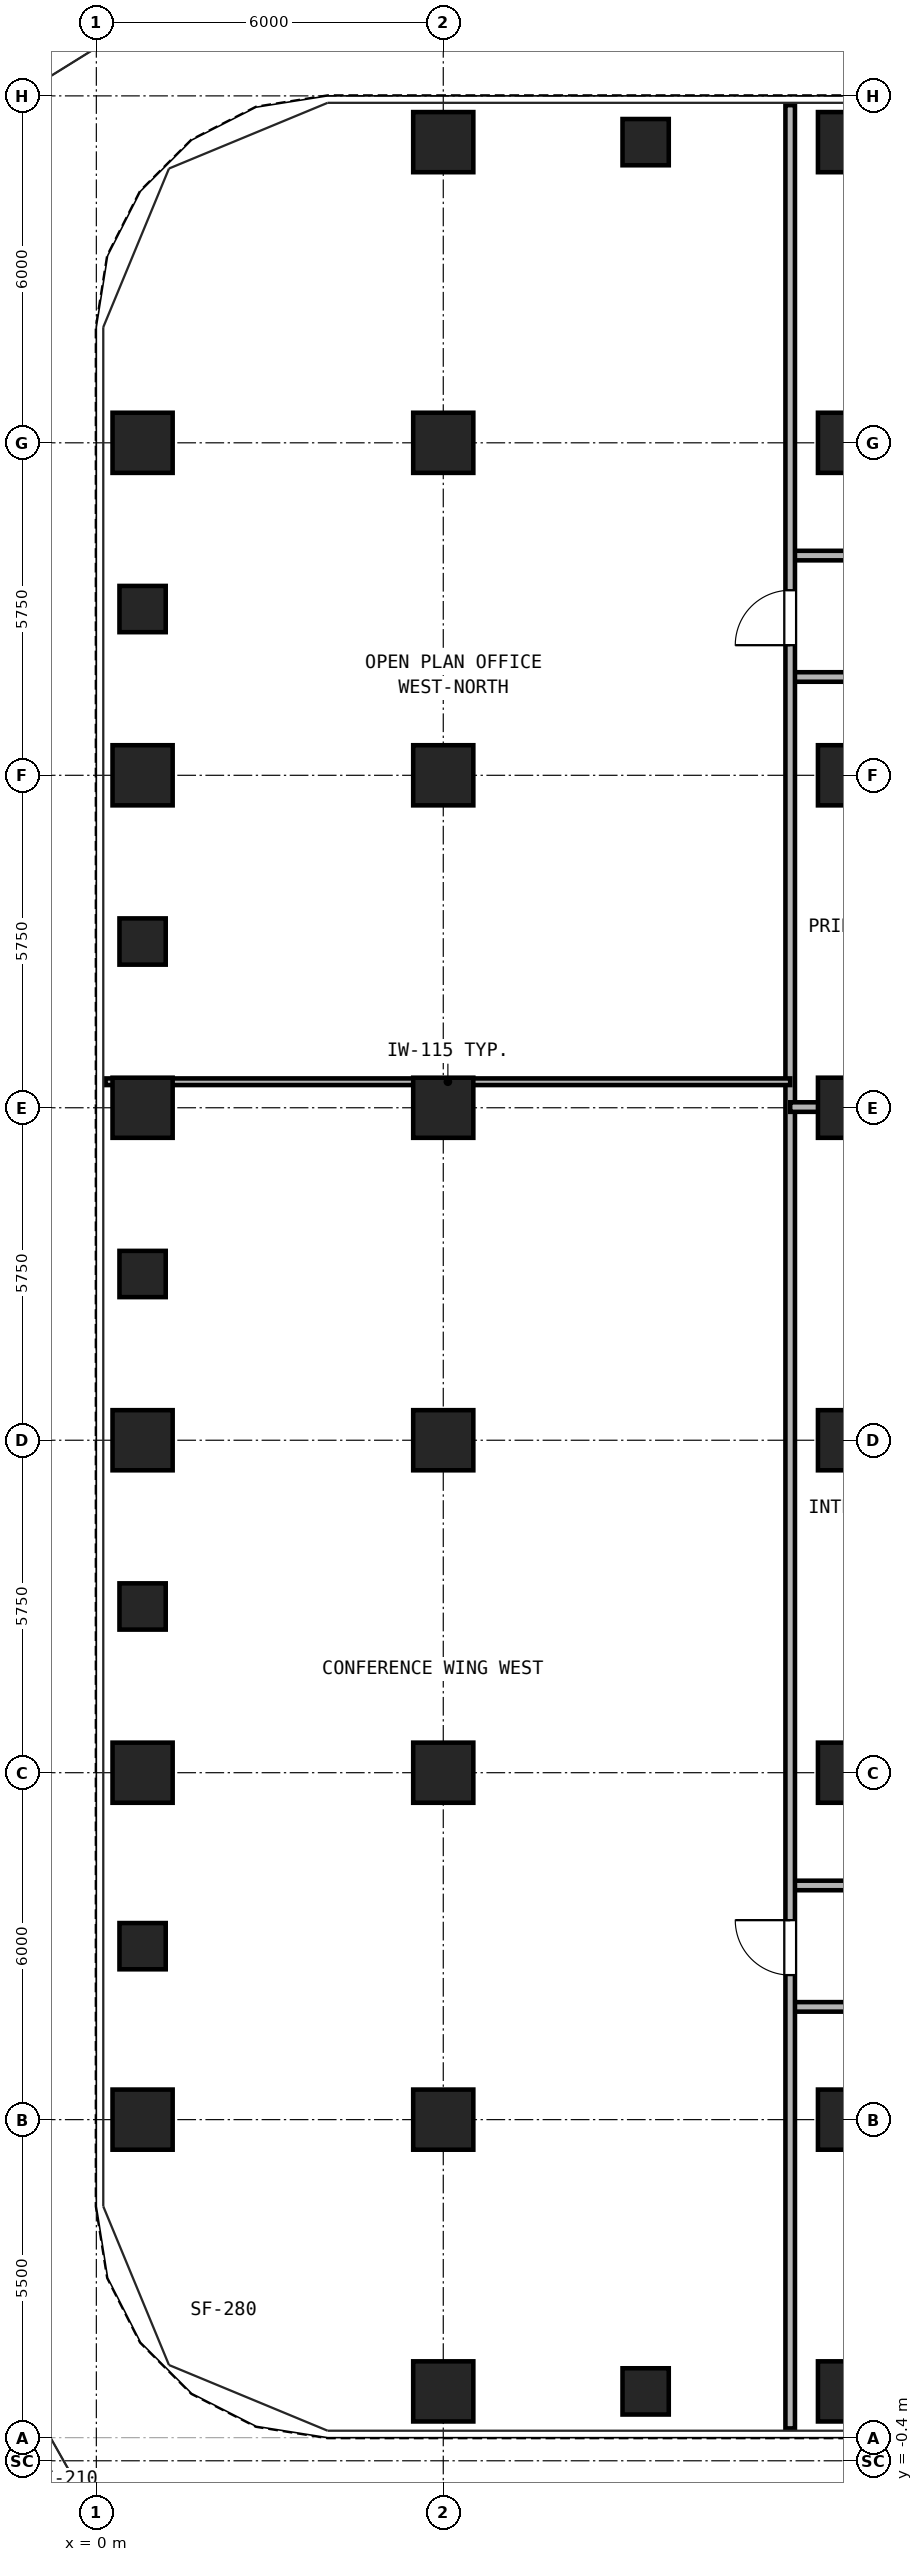
"""IFC4 building model, lengths in metres.
Left out: names, types, materials, properties, quantities, classifications, styles, units other than length and angle.
Written with IfcOpenShell. Run it as: python <this file> out.ifc"""

import sys

from ifc_helpers import new_model, si_unit, direction, frame, frame_2d, origin, origin_2d, place, context, subcontext, project, spatial, rectangle, hollow_rectangle, extrude, source, transform, mapped, element, fill, save


model = new_model("IFC4")
c1 = context("Model", 3, precision=1e-05, world=origin(), true_north=direction((0.0, 1.0)))
c2 = subcontext(c1, "Body", "Model", "MODEL_VIEW")
j1 = project(units=[si_unit("LENGTHUNIT", "METRE"), si_unit("PLANEANGLEUNIT", "RADIAN")], contexts=[c1])
p1 = place(None, origin())
s1 = spatial("IfcSite", under=j1, at=p1, CompositionType="ELEMENT")
p2 = place(p1, origin())
s2 = spatial("IfcBuilding", under=s1, at=p2, CompositionType="ELEMENT")
p3 = place(p2, frame((0.0, 0.0, 62.1)))
s3 = spatial("IfcBuildingStorey", under=s2, at=p3, CompositionType="ELEMENT", Elevation=62.1)
m1 = source(origin(), c2, "Body", "SweptSolid", [
    extrude(hollow_rectangle(XDim=1.04, YDim=1.04, WallThickness=0.065, at=origin_2d()), origin(), (0.0, 0.0, 1.0), 3.32),
])
for number, where, z_axis, x_axis in (
    (1, (6.0, 0.8, 0.0), (0.0, 0.0, 1.0), (1.0, 0.0, 0.0)),
    (2, (6.0, 39.7, 0.0), (0.0, 0.0, 1.0), (1.0, 0.0, 0.0)),
    (3, (13.0, 0.8, 0.0), (0.0, 0.0, 1.0), (1.0, 0.0, 0.0)),
    (4, (13.0, 39.7, 0.0), (0.0, 0.0, 1.0), (1.0, 0.0, 0.0)),
    (5, (0.8, 5.5, 0.0), (0.0, 0.0, 1.0), (1.0, 0.0, 0.0)),
    (6, (0.8, 11.5, 0.0), (0.0, 0.0, 1.0), (1.0, 0.0, 0.0)),
    (7, (0.8, 17.25, 0.0), (0.0, 0.0, 1.0), (1.0, 0.0, 0.0)),
    (8, (0.8, 23.0, 0.0), (0.0, 0.0, 1.0), (1.0, 0.0, 0.0)),
    (9, (0.8, 28.75, 0.0), (0.0, 0.0, 1.0), (1.0, 0.0, 0.0)),
    (10, (0.8, 34.5, 0.0), (0.0, 0.0, 1.0), (1.0, 0.0, 0.0)),
    (11, (6.0, 5.5, 0.0), (0.0, 0.0, 1.0), (1.0, 0.0, 0.0)),
    (12, (6.0, 11.5, 0.0), (0.0, 0.0, 1.0), (1.0, 0.0, 0.0)),
    (13, (6.0, 17.25, 0.0), (0.0, 0.0, 1.0), (1.0, 0.0, 0.0)),
    (14, (6.0, 23.0, 0.0), (0.0, 0.0, 1.0), (1.0, 0.0, 0.0)),
    (15, (6.0, 28.75, 0.0), (0.0, 0.0, 1.0), (1.0, 0.0, 0.0)),
    (16, (6.0, 34.5, 0.0), (0.0, 0.0, 1.0), (1.0, 0.0, 0.0)),
    (17, (13.0, 5.5, 0.0), (0.0, 0.0, 1.0), (1.0, 0.0, 0.0)),
    (18, (13.0, 11.5, 0.0), (0.0, 0.0, 1.0), (1.0, 0.0, 0.0)),
    (19, (13.0, 17.25, 0.0), (0.0, 0.0, 1.0), (1.0, 0.0, 0.0)),
    (20, (13.0, 23.0, 0.0), (0.0, 0.0, 1.0), (1.0, 0.0, 0.0)),
    (21, (13.0, 28.75, 0.0), (0.0, 0.0, 1.0), (1.0, 0.0, 0.0)),
    (22, (13.0, 34.5, 0.0), (0.0, 0.0, 1.0), (1.0, 0.0, 0.0)),
):
    element("IfcColumn", number, at=place(p3, frame(where, z_axis=z_axis, x_axis=x_axis)), inside=s3, PredefinedType="COLUMN", context=c2, shape_type="MappedRepresentation", body=[
        mapped(m1, transform((0.0, 0.0, 0.0), x_axis=(1.0, 0.0, 0.0), y_axis=(0.0, 1.0, 0.0), z_axis=(0.0, 0.0, 1.0), scale=1.0)),
    ])
m2 = source(origin(), c2, "Body", "SweptSolid", [
    extrude(hollow_rectangle(XDim=0.8, YDim=0.8, WallThickness=0.045, at=origin_2d()), origin(), (0.0, 0.0, 1.0), 3.32),
])
for number, where, z_axis, x_axis in (
    (23, (9.5, 0.8, 0.0), (0.0, 0.0, 1.0), (1.0, 0.0, 0.0)),
    (24, (9.5, 39.7, 0.0), (0.0, 0.0, 1.0), (1.0, 0.0, 0.0)),
    (25, (0.8, 8.5, 0.0), (0.0, 0.0, 1.0), (1.0, 0.0, 0.0)),
    (26, (0.8, 14.375, 0.0), (0.0, 0.0, 1.0), (1.0, 0.0, 0.0)),
    (27, (0.8, 20.125, 0.0), (0.0, 0.0, 1.0), (1.0, 0.0, 0.0)),
    (28, (0.8, 25.875, 0.0), (0.0, 0.0, 1.0), (1.0, 0.0, 0.0)),
    (29, (0.8, 31.625, 0.0), (0.0, 0.0, 1.0), (1.0, 0.0, 0.0)),
):
    element("IfcColumn", number, at=place(p3, frame(where, z_axis=z_axis, x_axis=x_axis)), inside=s3, PredefinedType="COLUMN", context=c2, shape_type="MappedRepresentation", body=[
        mapped(m2, transform((0.0, 0.0, 0.0), x_axis=(1.0, 0.0, 0.0), y_axis=(0.0, 1.0, 0.0), z_axis=(0.0, 0.0, 1.0), scale=1.0)),
    ])
p4 = place(p3, frame((12.0, 7.45, 0.0), z_axis=(0.0, 0.0, 1.0), x_axis=(1.0, 0.0, 0.0)))
e30 = element("IfcWall", 30, at=p4, inside=s3, PredefinedType="PARTITIONING", context=c2, shape_type="SweptSolid", body=[
    extrude(rectangle(XDim=23.0, YDim=0.165, at=frame_2d((11.5, 0.0))), origin(), (0.0, 0.0, 1.0), 3.32),
])
p5 = place(p4, frame((7.5, 0.0, 0.0)))
e31 = element("IfcOpeningElement", 31, at=p5, cuts=e30, PredefinedType="OPENING", context=c2, shape_type="SweptSolid", body=[
    extrude(rectangle(XDim=0.95, YDim=2.15, at=frame_2d((0.475, 1.075))), frame((0.0, 0.093, 0.0), z_axis=(0.0, -1.0, 0.0), x_axis=(1.0, 0.0, 0.0)), (0.0, 0.0, 1.0), 0.185),
])
p6 = place(p4, frame((17.9, 0.0, 0.0)))
e32 = element("IfcOpeningElement", 32, at=p6, cuts=e30, PredefinedType="OPENING", context=c2, shape_type="SweptSolid", body=[
    extrude(rectangle(XDim=0.95, YDim=2.15, at=frame_2d((0.475, 1.075))), frame((0.0, 0.093, 0.0), z_axis=(0.0, -1.0, 0.0), x_axis=(1.0, 0.0, 0.0)), (0.0, 0.0, 1.0), 0.185),
])
p7 = place(p4, frame((21.4, 0.0, 0.0)))
e33 = element("IfcOpeningElement", 33, at=p7, cuts=e30, PredefinedType="OPENING", context=c2, shape_type="SweptSolid", body=[
    extrude(rectangle(XDim=0.92, YDim=2.1, at=frame_2d((0.46, 1.05))), frame((0.0, 0.093, 0.0), z_axis=(0.0, -1.0, 0.0), x_axis=(1.0, 0.0, 0.0)), (0.0, 0.0, 1.0), 0.185),
])
p8 = place(p3, frame((12.0, 32.55, 0.0), z_axis=(0.0, 0.0, 1.0), x_axis=(1.0, 0.0, 0.0)))
e34 = element("IfcWall", 34, at=p8, inside=s3, PredefinedType="PARTITIONING", context=c2, shape_type="SweptSolid", body=[
    extrude(rectangle(XDim=23.0, YDim=0.165, at=frame_2d((11.5, 0.0))), origin(), (0.0, 0.0, 1.0), 3.32),
])
p9 = place(p8, frame((5.75, 0.0, 0.0)))
e35 = element("IfcOpeningElement", 35, at=p9, cuts=e34, PredefinedType="OPENING", context=c2, shape_type="SweptSolid", body=[
    extrude(rectangle(XDim=0.95, YDim=2.15, at=frame_2d((0.475, 1.075))), frame((0.0, 0.093, 0.0), z_axis=(0.0, -1.0, 0.0), x_axis=(1.0, 0.0, 0.0)), (0.0, 0.0, 1.0), 0.185),
])
p10 = place(p8, frame((17.25, 0.0, 0.0)))
e36 = element("IfcOpeningElement", 36, at=p10, cuts=e34, PredefinedType="OPENING", context=c2, shape_type="SweptSolid", body=[
    extrude(rectangle(XDim=0.95, YDim=2.15, at=frame_2d((0.475, 1.075))), frame((0.0, 0.093, 0.0), z_axis=(0.0, -1.0, 0.0), x_axis=(1.0, 0.0, 0.0)), (0.0, 0.0, 1.0), 0.185),
])
for number, where, z_axis, x_axis in (
    (37, (12.0, 9.55, 0.0), (0.0, 0.0, 1.0), (1.0, 0.0, 0.0)),
    (38, (12.0, 30.45, 0.0), (0.0, 0.0, 1.0), (1.0, 0.0, 0.0)),
):
    element("IfcWall", number, at=place(p3, frame(where, z_axis=z_axis, x_axis=x_axis)), inside=s3, PredefinedType="PARTITIONING", context=c2, shape_type="SweptSolid", body=[
        extrude(rectangle(XDim=4.3, YDim=0.165, at=frame_2d((2.15, 0.0))), origin(), (0.0, 0.0, 1.0), 3.32),
    ])
p11 = place(p3, frame((12.0, 0.16, 0.0), z_axis=(0.0, 0.0, 1.0), x_axis=(0.0, 1.0, 0.0)))
e39 = element("IfcWall", 39, at=p11, inside=s3, PredefinedType="PARTITIONING", context=c2, shape_type="SweptSolid", body=[
    extrude(rectangle(XDim=40.18, YDim=0.165, at=frame_2d((20.09, 0.0))), origin(), (0.0, 0.0, 1.0), 3.32),
])
p12 = place(p11, frame((7.84, 0.0, 0.0)))
e40 = element("IfcOpeningElement", 40, at=p12, cuts=e39, PredefinedType="OPENING", context=c2, shape_type="SweptSolid", body=[
    extrude(rectangle(XDim=0.95, YDim=2.15, at=frame_2d((0.475, 1.075))), frame((0.0, 0.093, 0.0), z_axis=(0.0, -1.0, 0.0), x_axis=(1.0, 0.0, 0.0)), (0.0, 0.0, 1.0), 0.185),
])
p13 = place(p11, frame((30.84, 0.0, 0.0)))
e41 = element("IfcOpeningElement", 41, at=p13, cuts=e39, PredefinedType="OPENING", context=c2, shape_type="SweptSolid", body=[
    extrude(rectangle(XDim=0.95, YDim=2.15, at=frame_2d((0.475, 1.075))), frame((0.0, 0.093, 0.0), z_axis=(0.0, -1.0, 0.0), x_axis=(1.0, 0.0, 0.0)), (0.0, 0.0, 1.0), 0.185),
])
p14 = place(p3, frame((0.16, 23.45, 0.0), z_axis=(0.0, 0.0, 1.0), x_axis=(1.0, 0.0, 0.0)))
e42 = element("IfcWall", 42, at=p14, inside=s3, PredefinedType="PARTITIONING", context=c2, shape_type="SweptSolid", body=[
    extrude(rectangle(XDim=11.84, YDim=0.115, at=frame_2d((5.92, 0.0))), origin(), (0.0, 0.0, 1.0), 3.32),
])
p15 = place(p3, frame((12.0, 23.012, 0.0), z_axis=(0.0, 0.0, 1.0), x_axis=(1.0, 0.0, 0.0)))
e43 = element("IfcWall", 43, at=p15, inside=s3, PredefinedType="PARTITIONING", context=c2, shape_type="SweptSolid", body=[
    extrude(rectangle(XDim=4.3, YDim=0.165, at=frame_2d((2.15, 0.0))), origin(), (0.0, 0.0, 1.0), 2.539),
])
p16 = place(p12, frame((0.95, 0.0, 0.0), z_axis=(0.0, 0.0, 1.0), x_axis=(-1.0, 0.0, 0.0)))
e44 = element("IfcDoor", 44, at=p16, inside=s3, OperationType="SINGLE_SWING_RIGHT", PredefinedType="DOOR", context=c2, shape_type="SweptSolid", body=[
    extrude(rectangle(XDim=0.95, YDim=2.15, at=frame_2d((0.475, 1.075))), frame((0.0, 0.025, 0.0), z_axis=(0.0, -1.0, 0.0), x_axis=(1.0, 0.0, 0.0)), (0.0, 0.0, 1.0), 0.05),
])
fill(e40, e44)
p17 = place(p13, frame((0.95, 0.0, 0.0), z_axis=(0.0, 0.0, 1.0), x_axis=(-1.0, 0.0, 0.0)))
e45 = element("IfcDoor", 45, at=p17, inside=s3, OperationType="SINGLE_SWING_LEFT", PredefinedType="DOOR", context=c2, shape_type="SweptSolid", body=[
    extrude(rectangle(XDim=0.95, YDim=2.15, at=frame_2d((0.475, 1.075))), frame((0.0, 0.025, 0.0), z_axis=(0.0, -1.0, 0.0), x_axis=(1.0, 0.0, 0.0)), (0.0, 0.0, 1.0), 0.05),
])
fill(e41, e45)
save(model, sys.argv[1])
